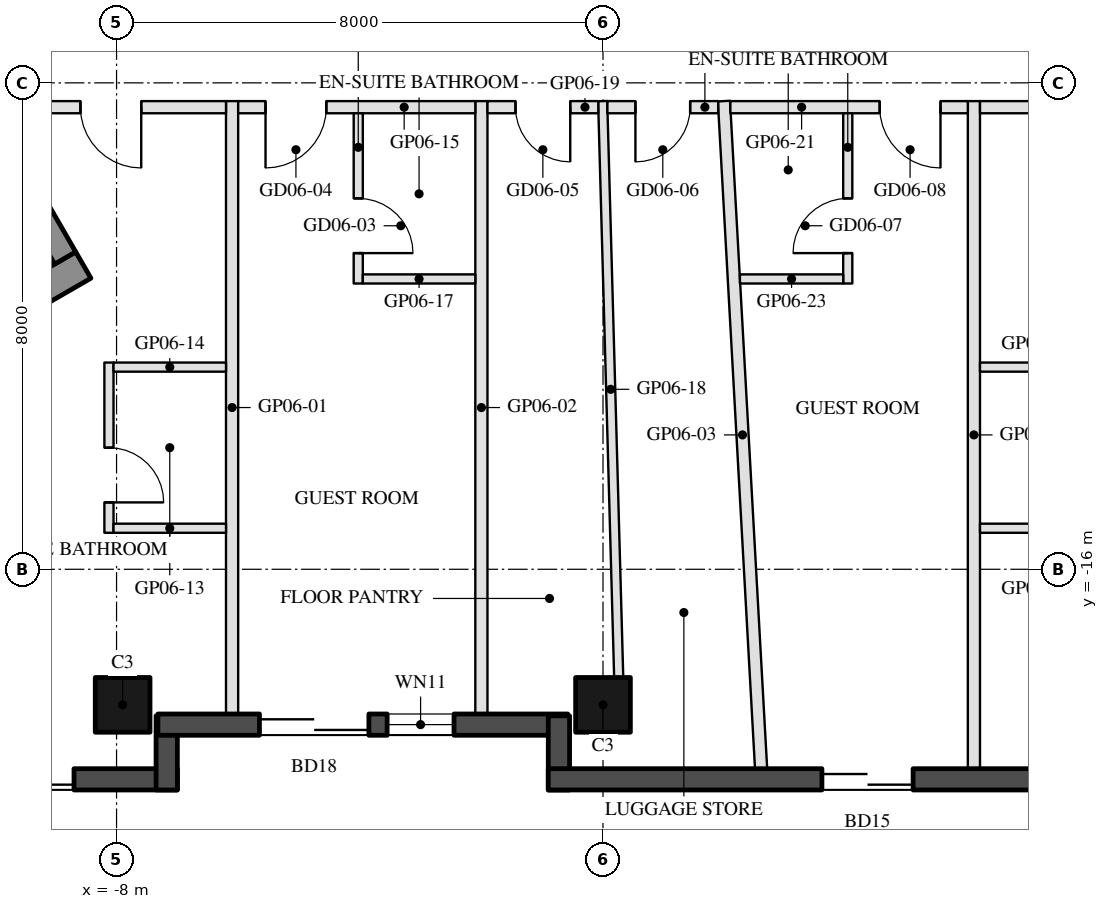
"""IFC4 building model, lengths in metres.
Left out: names, types, materials, properties, quantities, classifications, styles, units other than length and angle.
Written with IfcOpenShell. Run it as: python <this file> out.ifc"""

import sys

from ifc_helpers import new_model, si_unit, direction, frame, frame_2d, origin, origin_2d, place, context, subcontext, project, spatial, rectangle, hollow_rectangle, extrude, element, fill, save


model = new_model("IFC4")
c1 = context("Model", 3, precision=1e-05, world=origin(), true_north=direction((0.0, 1.0)))
c2 = subcontext(c1, "Body", "Model", "MODEL_VIEW")
j1 = project(units=[si_unit("LENGTHUNIT", "METRE"), si_unit("PLANEANGLEUNIT", "RADIAN")], contexts=[c1])
p1 = place(None, origin())
s1 = spatial("IfcSite", under=j1, at=p1, CompositionType="ELEMENT")
p2 = place(p1, origin())
s2 = spatial("IfcBuilding", under=s1, at=p2, CompositionType="ELEMENT")
p3 = place(p2, frame((0.0, 0.0, 90.9)))
s3 = spatial("IfcBuildingStorey", under=s2, at=p3, CompositionType="ELEMENT", Elevation=90.9)
for number, where, z_axis, x_axis in (
    (1, (-7.9, -18.23, 0.0), (0.0, 0.0, 1.0), (-1.0, 0.0, 0.0)),
    (2, (0.0, -18.23, 0.0), (0.0, 0.0, 1.0), (-1.0, 0.0, 0.0)),
):
    element("IfcColumn", number, at=place(p3, frame(where, z_axis=z_axis, x_axis=x_axis)), inside=s3, PredefinedType="COLUMN", context=c2, shape_type="SweptSolid", body=[
        extrude(hollow_rectangle(XDim=0.9, YDim=0.9, WallThickness=0.04, at=origin_2d()), origin(), (0.0, 0.0, 1.0), 3.7),
    ])
p4 = place(p3, frame((-18.816, -19.455, 0.0), z_axis=(0.0, 0.0, 1.0), x_axis=(1.0, 0.0, 0.0)))
e3 = element("IfcWall", 3, at=p4, inside=s3, PredefinedType="SOLIDWALL", context=c2, shape_type="SweptSolid", body=[
    extrude(rectangle(XDim=11.816, YDim=0.35, at=frame_2d((5.908, 0.0))), origin(), (0.0, 0.0, 1.0), 3.55),
])
p5 = place(p4, frame((0.381, 0.0, 0.3)))
e4 = element("IfcOpeningElement", 4, at=p5, cuts=e3, PredefinedType="OPENING", context=c2, shape_type="SweptSolid", body=[
    extrude(rectangle(XDim=1.8, YDim=2.65, at=frame_2d((0.9, 1.325))), frame((0.0, 0.185, 0.0), z_axis=(0.0, -1.0, 0.0), x_axis=(1.0, 0.0, 0.0)), (0.0, 0.0, 1.0), 0.37),
])
p6 = place(p4, frame((7.716, 0.0, 0.0)))
e5 = element("IfcOpeningElement", 5, at=p6, cuts=e3, PredefinedType="OPENING", context=c2, shape_type="SweptSolid", body=[
    extrude(rectangle(XDim=2.4, YDim=2.4, at=frame_2d((1.2, 1.2))), frame((0.0, 0.185, 0.0), z_axis=(0.0, -1.0, 0.0), x_axis=(1.0, 0.0, 0.0)), (0.0, 0.0, 1.0), 0.37),
])
p7 = place(p4, frame((3.816, 0.0, 0.3)))
e6 = element("IfcOpeningElement", 6, at=p7, cuts=e3, PredefinedType="OPENING", context=c2, shape_type="SweptSolid", body=[
    extrude(rectangle(XDim=1.6, YDim=2.65, at=frame_2d((0.8, 1.325))), frame((0.0, 0.185, 0.0), z_axis=(0.0, -1.0, 0.0), x_axis=(1.0, 0.0, 0.0)), (0.0, 0.0, 1.0), 0.37),
])
p8 = place(p4, frame((5.716, 0.0, 0.3)))
e7 = element("IfcOpeningElement", 7, at=p8, cuts=e3, PredefinedType="OPENING", context=c2, shape_type="SweptSolid", body=[
    extrude(rectangle(XDim=1.6, YDim=2.65, at=frame_2d((0.8, 1.325))), frame((0.0, 0.185, 0.0), z_axis=(0.0, -1.0, 0.0), x_axis=(1.0, 0.0, 0.0)), (0.0, 0.0, 1.0), 0.37),
])
p9 = place(p3, frame((-7.175, -19.63, 0.0), z_axis=(0.0, 0.0, 1.0), x_axis=(0.0, 1.0, 0.0)))
e8 = element("IfcWall", 8, at=p9, inside=s3, PredefinedType="SOLIDWALL", context=c2, shape_type="SweptSolid", body=[
    extrude(rectangle(XDim=1.22, YDim=0.35, at=frame_2d((0.61, 0.0))), origin(), (0.0, 0.0, 1.0), 3.55),
])
p10 = place(p3, frame((-7.32, -18.555, 0.0), z_axis=(0.0, 0.0, 1.0), x_axis=(1.0, 0.0, 0.0)))
e9 = element("IfcWall", 9, at=p10, inside=s3, PredefinedType="SOLIDWALL", context=c2, shape_type="SweptSolid", body=[
    extrude(rectangle(XDim=6.74, YDim=0.35, at=frame_2d((3.37, 0.0))), origin(), (0.0, 0.0, 1.0), 3.55),
])
p11 = place(p10, frame((1.67, 0.0, 0.0)))
e10 = element("IfcOpeningElement", 10, at=p11, cuts=e9, PredefinedType="OPENING", context=c2, shape_type="SweptSolid", body=[
    extrude(rectangle(XDim=1.8, YDim=2.4, at=frame_2d((0.9, 1.2))), frame((0.0, 0.185, 0.0), z_axis=(0.0, -1.0, 0.0), x_axis=(1.0, 0.0, 0.0)), (0.0, 0.0, 1.0), 0.37),
])
p12 = place(p10, frame((3.77, 0.0, 0.3)))
e11 = element("IfcOpeningElement", 11, at=p12, cuts=e9, PredefinedType="OPENING", context=c2, shape_type="SweptSolid", body=[
    extrude(rectangle(XDim=1.1, YDim=2.65, at=frame_2d((0.55, 1.325))), frame((0.0, 0.185, 0.0), z_axis=(0.0, -1.0, 0.0), x_axis=(1.0, 0.0, 0.0)), (0.0, 0.0, 1.0), 0.37),
])
p13 = place(p3, frame((-0.725, -18.41, 0.0), z_axis=(0.0, 0.0, 1.0), x_axis=(0.0, -1.0, 0.0)))
e12 = element("IfcWall", 12, at=p13, inside=s3, PredefinedType="SOLIDWALL", context=c2, shape_type="SweptSolid", body=[
    extrude(rectangle(XDim=1.22, YDim=0.35, at=frame_2d((0.61, 0.0))), origin(), (0.0, 0.0, 1.0), 3.55),
])
p14 = place(p3, frame((-0.9, -19.455, 0.0), z_axis=(0.0, 0.0, 1.0), x_axis=(1.0, 0.0, 0.0)))
e13 = element("IfcWall", 13, at=p14, inside=s3, PredefinedType="SOLIDWALL", context=c2, shape_type="SweptSolid", body=[
    extrude(rectangle(XDim=9.7, YDim=0.35, at=frame_2d((4.85, 0.0))), origin(), (0.0, 0.0, 1.0), 3.55),
])
p15 = place(p14, frame((4.5, 0.0, 0.0)))
e14 = element("IfcOpeningElement", 14, at=p15, cuts=e13, PredefinedType="OPENING", context=c2, shape_type="SweptSolid", body=[
    extrude(rectangle(XDim=1.5, YDim=2.4, at=frame_2d((0.75, 1.2))), frame((0.0, 0.185, 0.0), z_axis=(0.0, -1.0, 0.0), x_axis=(1.0, 0.0, 0.0)), (0.0, 0.0, 1.0), 0.37),
])
p16 = place(p3, frame((-8.547, -10.997, 0.0), z_axis=(0.0, 0.0, 1.0), x_axis=(-0.866025009528, -0.500000682871, 0.0)))
e15 = element("IfcWall", 15, at=p16, inside=s3, PredefinedType="SHEAR", context=c2, shape_type="SweptSolid", body=[
    extrude(rectangle(XDim=14.837, YDim=0.5, at=frame_2d((7.418, 0.0))), origin(), (0.0, 0.0, 1.0), 3.5),
])
p17 = place(p3, frame((-13.845, -2.22, 0.0), z_axis=(0.0, 0.0, 1.0), x_axis=(0.500004234368, -0.866022959057, 0.0)))
e16 = element("IfcWall", 16, at=p17, inside=s3, PredefinedType="SHEAR", context=c2, shape_type="SweptSolid", body=[
    extrude(rectangle(XDim=10.0, YDim=0.4, at=frame_2d((5.0, 0.0))), origin(), (0.0, 0.0, 1.0), 3.5),
])
p18 = place(p17, frame((3.55, 0.0, 0.0)))
e17 = element("IfcOpeningElement", 17, at=p18, cuts=e16, PredefinedType="OPENING", context=c2, shape_type="SweptSolid", body=[
    extrude(rectangle(XDim=1.1, YDim=2.1, at=frame_2d((0.55, 1.05))), frame((0.0, 0.21, 0.0), z_axis=(0.0, -1.0, 0.0), x_axis=(1.0, 0.0, 0.0)), (0.0, 0.0, 1.0), 0.42),
])
p19 = place(p17, frame((5.85, 0.0, 0.0)))
e18 = element("IfcOpeningElement", 18, at=p19, cuts=e16, PredefinedType="OPENING", context=c2, shape_type="SweptSolid", body=[
    extrude(rectangle(XDim=1.4, YDim=2.1, at=frame_2d((0.7, 1.05))), frame((0.0, 0.21, 0.0), z_axis=(0.0, -1.0, 0.0), x_axis=(1.0, 0.0, 0.0)), (0.0, 0.0, 1.0), 0.42),
])
for number, where, z_axis, x_axis in (
    (19, (-6.1, -18.38, 0.0), (0.0, 0.0, 1.0), (0.0, 1.0, 0.0)),
    (20, (-2.0, -18.38, 0.0), (0.0, 0.0, 1.0), (0.0, 1.0, 0.0)),
):
    element("IfcWall", number, at=place(p3, frame(where, z_axis=z_axis, x_axis=x_axis)), inside=s3, PredefinedType="PARTITIONING", context=c2, shape_type="SweptSolid", body=[
        extrude(rectangle(XDim=10.08, YDim=0.2, at=frame_2d((5.04, 0.0))), origin(), (0.0, 0.0, 1.0), 2.96),
    ])
p20 = place(p3, frame((2.6, -19.28, 0.0), z_axis=(0.0, 0.0, 1.0), x_axis=(-0.055568385591, 0.998454883569, 0.0)))
e21 = element("IfcWall", 21, at=p20, inside=s3, PredefinedType="PARTITIONING", context=c2, shape_type="SweptSolid", body=[
    extrude(rectangle(XDim=10.997, YDim=0.2, at=frame_2d((5.499, 0.0))), origin(), (0.0, 0.0, 1.0), 2.96),
])
p21 = place(p3, frame((6.1, -19.28, 0.0), z_axis=(0.0, 0.0, 1.0), x_axis=(0.0, 1.0, 0.0)))
e22 = element("IfcWall", 22, at=p21, inside=s3, PredefinedType="PARTITIONING", context=c2, shape_type="SweptSolid", body=[
    extrude(rectangle(XDim=10.98, YDim=0.2, at=frame_2d((5.49, 0.0))), origin(), (0.0, 0.0, 1.0), 2.96),
])
p22 = place(p3, frame((-6.2, -8.4, 0.0), z_axis=(0.0, 0.0, 1.0), x_axis=(-1.0, 0.0, 0.0)))
e23 = element("IfcWall", 23, at=p22, inside=s3, PredefinedType="PARTITIONING", context=c2, shape_type="SweptSolid", body=[
    extrude(rectangle(XDim=3.788, YDim=0.2, at=frame_2d((1.894, 0.0))), origin(), (0.0, 0.0, 1.0), 2.95),
])
p23 = place(p22, frame((1.394, 0.0, 0.0)))
e24 = element("IfcOpeningElement", 24, at=p23, cuts=e23, PredefinedType="OPENING", context=c2, shape_type="SweptSolid", body=[
    extrude(rectangle(XDim=1.0, YDim=2.1, at=frame_2d((0.5, 1.05))), frame((0.0, 0.11, 0.0), z_axis=(0.0, -1.0, 0.0), x_axis=(1.0, 0.0, 0.0)), (0.0, 0.0, 1.0), 0.22),
])
p24 = place(p3, frame((-8.125, -12.6, 0.0), z_axis=(0.0, 0.0, 1.0), x_axis=(0.0, -1.0, 0.0)))
e25 = element("IfcWall", 25, at=p24, inside=s3, PredefinedType="PARTITIONING", context=c2, shape_type="SweptSolid", body=[
    extrude(rectangle(XDim=2.8, YDim=0.15, at=frame_2d((1.4, 0.0))), origin(), (0.0, 0.0, 1.0), 3.55),
])
p25 = place(p24, frame((1.4, 0.0, 0.0)))
e26 = element("IfcOpeningElement", 26, at=p25, cuts=e25, PredefinedType="OPENING", context=c2, shape_type="SweptSolid", body=[
    extrude(rectangle(XDim=0.9, YDim=2.1, at=frame_2d((0.45, 1.05))), frame((0.0, 0.085, 0.0), z_axis=(0.0, -1.0, 0.0), x_axis=(1.0, 0.0, 0.0)), (0.0, 0.0, 1.0), 0.17),
])
for number, where, z_axis, x_axis in (
    (27, (-8.05, -15.325, 0.0), (0.0, 0.0, 1.0), (1.0, 0.0, 0.0)),
    (28, (-8.05, -12.675, 0.0), (0.0, 0.0, 1.0), (1.0, 0.0, 0.0)),
):
    element("IfcWall", number, at=place(p3, frame(where, z_axis=z_axis, x_axis=x_axis)), inside=s3, PredefinedType="PARTITIONING", context=c2, shape_type="SweptSolid", body=[
        extrude(rectangle(XDim=1.85, YDim=0.15, at=frame_2d((0.925, 0.0))), origin(), (0.0, 0.0, 1.0), 2.95),
    ])
p26 = place(p3, frame((-2.1, -8.4, 0.0), z_axis=(0.0, 0.0, 1.0), x_axis=(-1.0, 0.0, 0.0)))
e29 = element("IfcWall", 29, at=p26, inside=s3, PredefinedType="PARTITIONING", context=c2, shape_type="SweptSolid", body=[
    extrude(rectangle(XDim=3.9, YDim=0.2, at=frame_2d((1.95, 0.0))), origin(), (0.0, 0.0, 1.0), 2.95),
])
p27 = place(p26, frame((2.45, 0.0, 0.0)))
e30 = element("IfcOpeningElement", 30, at=p27, cuts=e29, PredefinedType="OPENING", context=c2, shape_type="SweptSolid", body=[
    extrude(rectangle(XDim=1.0, YDim=2.1, at=frame_2d((0.5, 1.05))), frame((0.0, 0.11, 0.0), z_axis=(0.0, -1.0, 0.0), x_axis=(1.0, 0.0, 0.0)), (0.0, 0.0, 1.0), 0.22),
])
p28 = place(p3, frame((-4.025, -8.5, 0.0), z_axis=(0.0, 0.0, 1.0), x_axis=(0.0, -1.0, 0.0)))
e31 = element("IfcWall", 31, at=p28, inside=s3, PredefinedType="PARTITIONING", context=c2, shape_type="SweptSolid", body=[
    extrude(rectangle(XDim=2.8, YDim=0.15, at=frame_2d((1.4, 0.0))), origin(), (0.0, 0.0, 1.0), 2.95),
])
p29 = place(p28, frame((1.4, 0.0, 0.0)))
e32 = element("IfcOpeningElement", 32, at=p29, cuts=e31, PredefinedType="OPENING", context=c2, shape_type="SweptSolid", body=[
    extrude(rectangle(XDim=0.9, YDim=2.1, at=frame_2d((0.45, 1.05))), frame((0.0, 0.085, 0.0), z_axis=(0.0, -1.0, 0.0), x_axis=(1.0, 0.0, 0.0)), (0.0, 0.0, 1.0), 0.17),
])
p30 = place(p3, frame((-3.95, -11.225, 0.0), z_axis=(0.0, 0.0, 1.0), x_axis=(1.0, 0.0, 0.0)))
e33 = element("IfcWall", 33, at=p30, inside=s3, PredefinedType="PARTITIONING", context=c2, shape_type="SweptSolid", body=[
    extrude(rectangle(XDim=1.85, YDim=0.15, at=frame_2d((0.925, 0.0))), origin(), (0.0, 0.0, 1.0), 2.95),
])
p31 = place(p3, frame((0.258, -17.78, 0.0), z_axis=(0.0, 0.0, 1.0), x_axis=(-0.027828517679, 0.999612711806, 0.0)))
e34 = element("IfcWall", 34, at=p31, inside=s3, PredefinedType="PARTITIONING", context=c2, shape_type="SweptSolid", body=[
    extrude(rectangle(XDim=9.484, YDim=0.15, at=frame_2d((4.742, 0.0))), origin(), (0.0, 0.0, 1.0), 2.95),
])
p32 = place(p3, frame((-0.078, -8.4, 0.0), z_axis=(0.0, 0.0, 1.0), x_axis=(-1.0, 0.0, 0.0)))
e35 = element("IfcWall", 35, at=p32, inside=s3, PredefinedType="PARTITIONING", context=c2, shape_type="SweptSolid", body=[
    extrude(rectangle(XDim=1.822, YDim=0.2, at=frame_2d((0.911, 0.0))), origin(), (0.0, 0.0, 1.0), 2.95),
])
p33 = place(p32, frame((0.461, 0.0, 0.0)))
e36 = element("IfcOpeningElement", 36, at=p33, cuts=e35, PredefinedType="OPENING", context=c2, shape_type="SweptSolid", body=[
    extrude(rectangle(XDim=0.9, YDim=2.1, at=frame_2d((0.45, 1.05))), frame((0.0, 0.11, 0.0), z_axis=(0.0, -1.0, 0.0), x_axis=(1.0, 0.0, 0.0)), (0.0, 0.0, 1.0), 0.22),
])
p34 = place(p3, frame((1.894, -8.4, 0.0), z_axis=(0.0, 0.0, 1.0), x_axis=(-1.0, 0.0, 0.0)))
e37 = element("IfcWall", 37, at=p34, inside=s3, PredefinedType="PARTITIONING", context=c2, shape_type="SweptSolid", body=[
    extrude(rectangle(XDim=1.822, YDim=0.2, at=frame_2d((0.911, 0.0))), origin(), (0.0, 0.0, 1.0), 2.95),
])
p35 = place(p34, frame((0.461, 0.0, 0.0)))
e38 = element("IfcOpeningElement", 38, at=p35, cuts=e37, PredefinedType="OPENING", context=c2, shape_type="SweptSolid", body=[
    extrude(rectangle(XDim=0.9, YDim=2.1, at=frame_2d((0.45, 1.05))), frame((0.0, 0.11, 0.0), z_axis=(0.0, -1.0, 0.0), x_axis=(1.0, 0.0, 0.0)), (0.0, 0.0, 1.0), 0.22),
])
p36 = place(p3, frame((6.0, -8.4, 0.0), z_axis=(0.0, 0.0, 1.0), x_axis=(-1.0, 0.0, 0.0)))
e39 = element("IfcWall", 39, at=p36, inside=s3, PredefinedType="PARTITIONING", context=c2, shape_type="SweptSolid", body=[
    extrude(rectangle(XDim=3.906, YDim=0.2, at=frame_2d((1.953, 0.0))), origin(), (0.0, 0.0, 1.0), 2.95),
])
p37 = place(p36, frame((0.45, 0.0, 0.0)))
e40 = element("IfcOpeningElement", 40, at=p37, cuts=e39, PredefinedType="OPENING", context=c2, shape_type="SweptSolid", body=[
    extrude(rectangle(XDim=1.0, YDim=2.1, at=frame_2d((0.5, 1.05))), frame((0.0, 0.11, 0.0), z_axis=(0.0, -1.0, 0.0), x_axis=(1.0, 0.0, 0.0)), (0.0, 0.0, 1.0), 0.22),
])
p38 = place(p3, frame((4.025, -11.3, 0.0), z_axis=(0.0, 0.0, 1.0), x_axis=(0.0, 1.0, 0.0)))
e41 = element("IfcWall", 41, at=p38, inside=s3, PredefinedType="PARTITIONING", context=c2, shape_type="SweptSolid", body=[
    extrude(rectangle(XDim=2.8, YDim=0.15, at=frame_2d((1.4, 0.0))), origin(), (0.0, 0.0, 1.0), 2.95),
])
p39 = place(p38, frame((0.5, 0.0, 0.0)))
e42 = element("IfcOpeningElement", 42, at=p39, cuts=e41, PredefinedType="OPENING", context=c2, shape_type="SweptSolid", body=[
    extrude(rectangle(XDim=0.9, YDim=2.1, at=frame_2d((0.45, 1.05))), frame((0.0, 0.085, 0.0), z_axis=(0.0, -1.0, 0.0), x_axis=(1.0, 0.0, 0.0)), (0.0, 0.0, 1.0), 0.17),
])
p40 = place(p3, frame((2.252, -11.225, 0.0), z_axis=(0.0, 0.0, 1.0), x_axis=(1.0, 0.0, 0.0)))
e43 = element("IfcWall", 43, at=p40, inside=s3, PredefinedType="PARTITIONING", context=c2, shape_type="SweptSolid", body=[
    extrude(rectangle(XDim=1.698, YDim=0.15, at=frame_2d((0.849, 0.0))), origin(), (0.0, 0.0, 1.0), 2.95),
])
p41 = place(p3, frame((9.988, -8.4, 0.0), z_axis=(0.0, 0.0, 1.0), x_axis=(-1.0, 0.0, 0.0)))
e44 = element("IfcWall", 44, at=p41, inside=s3, PredefinedType="PARTITIONING", context=c2, shape_type="SweptSolid", body=[
    extrude(rectangle(XDim=3.788, YDim=0.2, at=frame_2d((1.894, 0.0))), origin(), (0.0, 0.0, 1.0), 2.95),
])
p42 = place(p41, frame((1.394, 0.0, 0.0)))
e45 = element("IfcOpeningElement", 45, at=p42, cuts=e44, PredefinedType="OPENING", context=c2, shape_type="SweptSolid", body=[
    extrude(rectangle(XDim=1.0, YDim=2.1, at=frame_2d((0.5, 1.05))), frame((0.0, 0.11, 0.0), z_axis=(0.0, -1.0, 0.0), x_axis=(1.0, 0.0, 0.0)), (0.0, 0.0, 1.0), 0.22),
])
for number, where, z_axis, x_axis in (
    (46, (6.2, -15.325, 0.0), (0.0, 0.0, 1.0), (1.0, 0.0, 0.0)),
    (47, (6.2, -12.675, 0.0), (0.0, 0.0, 1.0), (1.0, 0.0, 0.0)),
):
    element("IfcWall", number, at=place(p3, frame(where, z_axis=z_axis, x_axis=x_axis)), inside=s3, PredefinedType="PARTITIONING", context=c2, shape_type="SweptSolid", body=[
        extrude(rectangle(XDim=1.85, YDim=0.15, at=frame_2d((0.925, 0.0))), origin(), (0.0, 0.0, 1.0), 2.95),
    ])
p43 = place(p6, frame((2.4, 0.0, 0.0), z_axis=(0.0, 0.0, 1.0), x_axis=(-1.0, 0.0, 0.0)))
e48 = element("IfcDoor", 48, at=p43, inside=s3, OperationType="SLIDING_TO_LEFT", PredefinedType="DOOR", context=c2, shape_type="SweptSolid", body=[
    extrude(rectangle(XDim=2.4, YDim=2.4, at=frame_2d((1.2, 1.2))), frame((0.0, 0.025, 0.0), z_axis=(0.0, -1.0, 0.0), x_axis=(1.0, 0.0, 0.0)), (0.0, 0.0, 1.0), 0.05),
])
fill(e5, e48)
p44 = place(p11, frame((1.8, 0.0, 0.0), z_axis=(0.0, 0.0, 1.0), x_axis=(-1.0, 0.0, 0.0)))
e49 = element("IfcDoor", 49, at=p44, inside=s3, OperationType="SLIDING_TO_LEFT", PredefinedType="DOOR", context=c2, shape_type="SweptSolid", body=[
    extrude(rectangle(XDim=1.8, YDim=2.4, at=frame_2d((0.9, 1.2))), frame((0.0, 0.025, 0.0), z_axis=(0.0, -1.0, 0.0), x_axis=(1.0, 0.0, 0.0)), (0.0, 0.0, 1.0), 0.05),
])
fill(e10, e49)
p45 = place(p12, origin())
e50 = element("IfcWindow", 50, at=p45, inside=s3, PartitioningType="SINGLE_PANEL", PredefinedType="WINDOW", context=c2, shape_type="SweptSolid", body=[
    extrude(rectangle(XDim=1.1, YDim=2.65, at=frame_2d((0.55, 1.325))), frame((0.0, 0.03, 0.0), z_axis=(0.0, -1.0, 0.0), x_axis=(1.0, 0.0, 0.0)), (0.0, 0.0, 1.0), 0.06),
])
fill(e11, e50)
p46 = place(p15, frame((1.5, 0.0, 0.0), z_axis=(0.0, 0.0, 1.0), x_axis=(-1.0, 0.0, 0.0)))
e51 = element("IfcDoor", 51, at=p46, inside=s3, OperationType="SLIDING_TO_LEFT", PredefinedType="DOOR", context=c2, shape_type="SweptSolid", body=[
    extrude(rectangle(XDim=1.5, YDim=2.4, at=frame_2d((0.75, 1.2))), frame((0.0, 0.025, 0.0), z_axis=(0.0, -1.0, 0.0), x_axis=(1.0, 0.0, 0.0)), (0.0, 0.0, 1.0), 0.05),
])
fill(e14, e51)
p47 = place(p25, origin())
e52 = element("IfcDoor", 52, at=p47, inside=s3, OperationType="SINGLE_SWING_RIGHT", PredefinedType="DOOR", context=c2, shape_type="SweptSolid", body=[
    extrude(rectangle(XDim=0.9, YDim=2.1, at=frame_2d((0.45, 1.05))), frame((0.0, 0.025, 0.0), z_axis=(0.0, -1.0, 0.0), x_axis=(1.0, 0.0, 0.0)), (0.0, 0.0, 1.0), 0.05),
])
fill(e26, e52)
p48 = place(p23, origin())
e53 = element("IfcDoor", 53, at=p48, inside=s3, OperationType="SINGLE_SWING_LEFT", PredefinedType="DOOR", context=c2, shape_type="SweptSolid", body=[
    extrude(rectangle(XDim=1.0, YDim=2.1, at=frame_2d((0.5, 1.05))), frame((0.0, 0.025, 0.0), z_axis=(0.0, -1.0, 0.0), x_axis=(1.0, 0.0, 0.0)), (0.0, 0.0, 1.0), 0.05),
])
fill(e24, e53)
p49 = place(p29, origin())
e54 = element("IfcDoor", 54, at=p49, inside=s3, OperationType="SINGLE_SWING_RIGHT", PredefinedType="DOOR", context=c2, shape_type="SweptSolid", body=[
    extrude(rectangle(XDim=0.9, YDim=2.1, at=frame_2d((0.45, 1.05))), frame((0.0, 0.025, 0.0), z_axis=(0.0, -1.0, 0.0), x_axis=(1.0, 0.0, 0.0)), (0.0, 0.0, 1.0), 0.05),
])
fill(e32, e54)
p50 = place(p27, origin())
e55 = element("IfcDoor", 55, at=p50, inside=s3, OperationType="SINGLE_SWING_RIGHT", PredefinedType="DOOR", context=c2, shape_type="SweptSolid", body=[
    extrude(rectangle(XDim=1.0, YDim=2.1, at=frame_2d((0.5, 1.05))), frame((0.0, 0.025, 0.0), z_axis=(0.0, -1.0, 0.0), x_axis=(1.0, 0.0, 0.0)), (0.0, 0.0, 1.0), 0.05),
])
fill(e30, e55)
p51 = place(p33, origin())
e56 = element("IfcDoor", 56, at=p51, inside=s3, OperationType="SINGLE_SWING_LEFT", PredefinedType="DOOR", context=c2, shape_type="SweptSolid", body=[
    extrude(rectangle(XDim=0.9, YDim=2.1, at=frame_2d((0.45, 1.05))), frame((0.0, 0.025, 0.0), z_axis=(0.0, -1.0, 0.0), x_axis=(1.0, 0.0, 0.0)), (0.0, 0.0, 1.0), 0.05),
])
fill(e36, e56)
p52 = place(p35, origin())
e57 = element("IfcDoor", 57, at=p52, inside=s3, OperationType="SINGLE_SWING_RIGHT", PredefinedType="DOOR", context=c2, shape_type="SweptSolid", body=[
    extrude(rectangle(XDim=0.9, YDim=2.1, at=frame_2d((0.45, 1.05))), frame((0.0, 0.025, 0.0), z_axis=(0.0, -1.0, 0.0), x_axis=(1.0, 0.0, 0.0)), (0.0, 0.0, 1.0), 0.05),
])
fill(e38, e57)
p53 = place(p39, origin())
e58 = element("IfcDoor", 58, at=p53, inside=s3, OperationType="SINGLE_SWING_LEFT", PredefinedType="DOOR", context=c2, shape_type="SweptSolid", body=[
    extrude(rectangle(XDim=0.9, YDim=2.1, at=frame_2d((0.45, 1.05))), frame((0.0, 0.025, 0.0), z_axis=(0.0, -1.0, 0.0), x_axis=(1.0, 0.0, 0.0)), (0.0, 0.0, 1.0), 0.05),
])
fill(e42, e58)
p54 = place(p37, origin())
e59 = element("IfcDoor", 59, at=p54, inside=s3, OperationType="SINGLE_SWING_LEFT", PredefinedType="DOOR", context=c2, shape_type="SweptSolid", body=[
    extrude(rectangle(XDim=1.0, YDim=2.1, at=frame_2d((0.5, 1.05))), frame((0.0, 0.025, 0.0), z_axis=(0.0, -1.0, 0.0), x_axis=(1.0, 0.0, 0.0)), (0.0, 0.0, 1.0), 0.05),
])
fill(e40, e59)
save(model, sys.argv[1])
